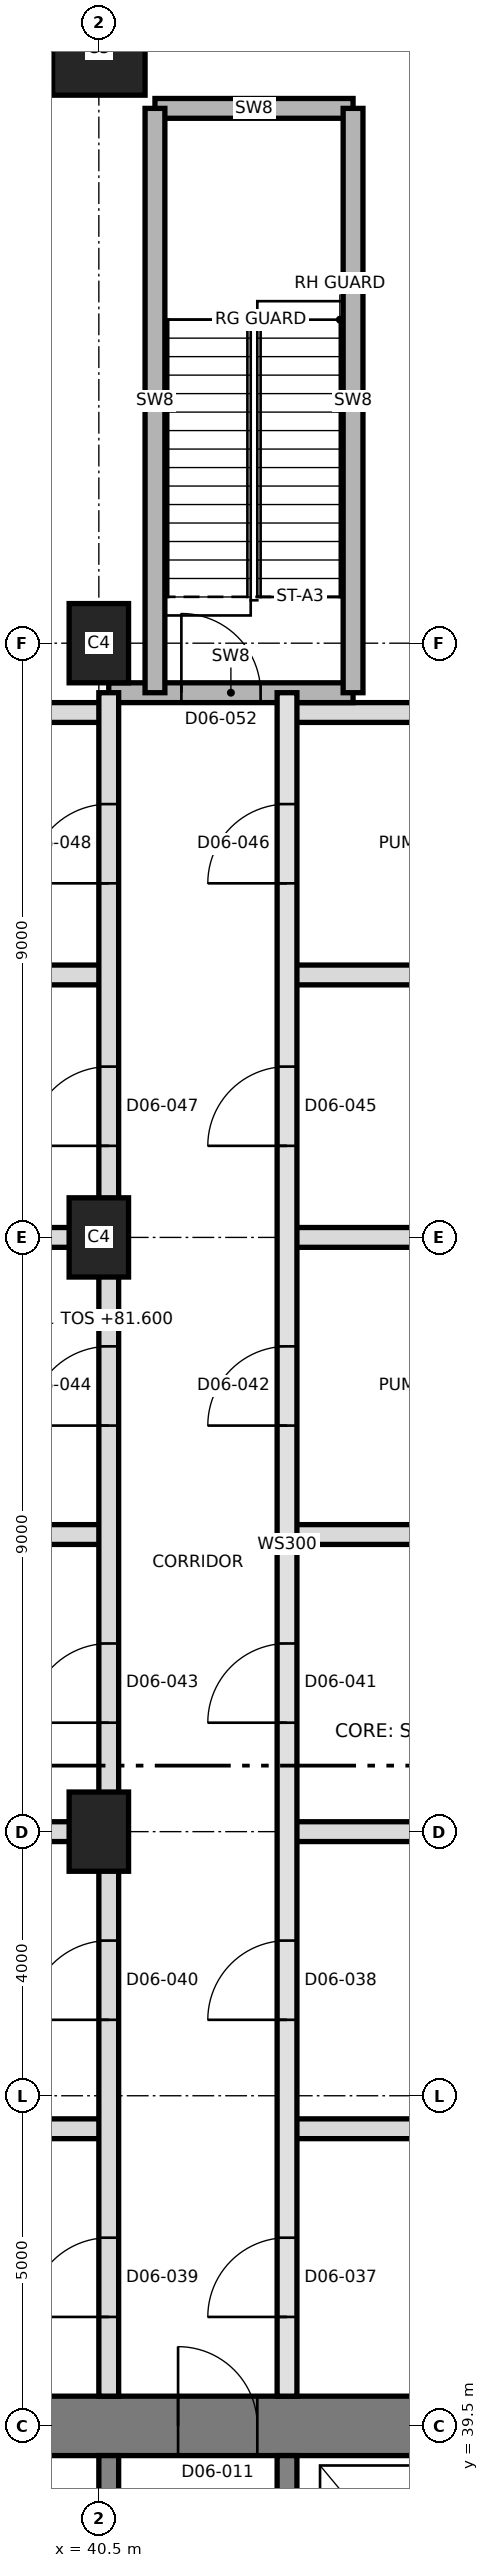
"""IFC4 building model, lengths in metres.
Left out: names, types, materials, properties, quantities, classifications, styles, units other than length and angle.
Written with IfcOpenShell. Run it as: python <this file> out.ifc"""

import sys

from ifc_helpers import new_model, si_unit, direction, frame, frame_2d, origin, origin_2d, place, context, subcontext, project, spatial, rectangle, extrude, element, fill, save


model = new_model("IFC4")
c1 = context("Model", 3, precision=1e-05, world=origin(), true_north=direction((0.0, 1.0)))
c2 = subcontext(c1, "Body", "Model", "MODEL_VIEW")
j1 = project(units=[si_unit("LENGTHUNIT", "METRE"), si_unit("PLANEANGLEUNIT", "RADIAN")], contexts=[c1])
p1 = place(None, origin())
s1 = spatial("IfcSite", under=j1, at=p1, CompositionType="ELEMENT")
p2 = place(p1, origin())
s2 = spatial("IfcBuilding", under=s1, at=p2, CompositionType="ELEMENT")
p3 = place(p2, frame((0.0, 0.0, 81.6)))
s3 = spatial("IfcBuildingStorey", under=s2, at=p3, CompositionType="ELEMENT", Elevation=81.6)
p4 = place(p3, frame((31.05, 39.5, 0.0), z_axis=(0.0, 0.0, 1.0), x_axis=(1.0, 0.0, 0.0)))
e1 = element("IfcWall", 1, at=p4, inside=s3, PredefinedType="SHEAR", context=c2, shape_type="SweptSolid", body=[
    extrude(rectangle(XDim=27.0, YDim=0.9, at=frame_2d((13.5, 0.0))), origin(), (0.0, 0.0, 1.0), 5.5),
])
p5 = place(p4, frame((10.65, 0.0, 0.0)))
e2 = element("IfcOpeningElement", 2, at=p5, cuts=e1, PredefinedType="OPENING", context=c2, shape_type="SweptSolid", body=[
    extrude(rectangle(XDim=1.2, YDim=2.1, at=frame_2d((0.6, 1.05))), frame((0.0, 0.46, 0.0), z_axis=(0.0, -1.0, 0.0), x_axis=(1.0, 0.0, 0.0)), (0.0, 0.0, 1.0), 0.92),
])
for number, where, z_axis, x_axis in (
    (3, (40.65, 33.5, 0.0), (0.0, 0.0, 1.0), (0.0, 1.0, 0.0)),
    (4, (43.35, 33.5, 0.0), (0.0, 0.0, 1.0), (0.0, 1.0, 0.0)),
):
    element("IfcWall", number, at=place(p3, frame(where, z_axis=z_axis, x_axis=x_axis)), inside=s3, PredefinedType="SHEAR", context=c2, shape_type="SweptSolid", body=[
        extrude(rectangle(XDim=5.55, YDim=0.3, at=frame_2d((2.775, 0.0))), origin(), (0.0, 0.0, 1.0), 5.5),
    ])
for number, where, z_axis, x_axis in (
    (5, (40.5, 48.5, 0.0), (0.0, 0.0, 1.0), (0.0, 1.0, 0.0)),
    (6, (40.5, 57.5, 0.0), (0.0, 0.0, 1.0), (0.0, 1.0, 0.0)),
    (7, (40.5, 66.5, 0.0), (0.0, 0.0, 1.0), (0.0, 1.0, 0.0)),
):
    element("IfcColumn", number, at=place(p3, frame(where, z_axis=z_axis, x_axis=x_axis)), inside=s3, PredefinedType="COLUMN", context=c2, shape_type="SweptSolid", body=[
        extrude(rectangle(XDim=1.2, YDim=0.9, at=origin_2d()), origin(), (0.0, 0.0, 1.0), 5.5),
    ])
p6 = place(p3, frame((40.5, 75.5, 0.0), z_axis=(0.0, 0.0, 1.0), x_axis=(1.0, 0.0, 0.0)))
e8 = element("IfcColumn", 8, at=p6, inside=s3, PredefinedType="COLUMN", context=c2, shape_type="SweptSolid", body=[
    extrude(rectangle(XDim=1.4, YDim=1.4, at=origin_2d()), origin(), (0.0, 0.0, 1.0), 5.5),
])
p7 = place(p3, frame((49.149, 72.498, 0.0), z_axis=(0.0, 0.0, 1.0), x_axis=(-0.773023777565, 0.634377048229, 0.0)))
e9 = element("IfcWall", 9, at=p7, inside=s3, PredefinedType="SOLIDWALL", context=c2, shape_type="SweptSolid", body=[
    extrude(rectangle(XDim=5.633, YDim=0.3, at=frame_2d((2.816, 0.0))), origin(), (0.0, 0.0, 1.0), 5.2),
])
p8 = place(p3, frame((39.978, 76.836, 0.0), z_axis=(0.0, 0.0, 1.0), x_axis=(-0.956941081769, -0.29028221789, 0.0)))
e10 = element("IfcWall", 10, at=p8, inside=s3, PredefinedType="SOLIDWALL", context=c2, shape_type="SweptSolid", body=[
    extrude(rectangle(XDim=5.646, YDim=0.3, at=frame_2d((2.823, 0.0))), origin(), (0.0, 0.0, 1.0), 5.2),
])
p9 = place(p3, frame((31.9, 44.0, 0.0), z_axis=(0.0, 0.0, 1.0), x_axis=(1.0, 0.0, 0.0)))
e11 = element("IfcWall", 11, at=p9, inside=s3, PredefinedType="PARTITIONING", context=c2, shape_type="SweptSolid", body=[
    extrude(rectangle(XDim=8.75, YDim=0.3, at=frame_2d((4.375, 0.0))), origin(), (0.0, 0.0, 1.0), 5.2),
])
p10 = place(p3, frame((43.35, 44.0, 0.0), z_axis=(0.0, 0.0, 1.0), x_axis=(1.0, 0.0, 0.0)))
e12 = element("IfcWall", 12, at=p10, inside=s3, PredefinedType="PARTITIONING", context=c2, shape_type="SweptSolid", body=[
    extrude(rectangle(XDim=7.592, YDim=0.3, at=frame_2d((3.796, 0.0))), origin(), (0.0, 0.0, 1.0), 5.15),
])
p11 = place(p3, frame((31.9, 48.5, 0.0), z_axis=(0.0, 0.0, 1.0), x_axis=(1.0, 0.0, 0.0)))
e13 = element("IfcWall", 13, at=p11, inside=s3, PredefinedType="PARTITIONING", context=c2, shape_type="SweptSolid", body=[
    extrude(rectangle(XDim=8.75, YDim=0.3, at=frame_2d((4.375, 0.0))), origin(), (0.0, 0.0, 1.0), 5.2),
])
p12 = place(p3, frame((43.35, 48.5, 0.0), z_axis=(0.0, 0.0, 1.0), x_axis=(1.0, 0.0, 0.0)))
e14 = element("IfcWall", 14, at=p12, inside=s3, PredefinedType="PARTITIONING", context=c2, shape_type="SweptSolid", body=[
    extrude(rectangle(XDim=7.3, YDim=0.3, at=frame_2d((3.65, 0.0))), origin(), (0.0, 0.0, 1.0), 5.15),
])
p13 = place(p3, frame((31.9, 53.0, 0.0), z_axis=(0.0, 0.0, 1.0), x_axis=(1.0, 0.0, 0.0)))
e15 = element("IfcWall", 15, at=p13, inside=s3, PredefinedType="PARTITIONING", context=c2, shape_type="SweptSolid", body=[
    extrude(rectangle(XDim=8.75, YDim=0.3, at=frame_2d((4.375, 0.0))), origin(), (0.0, 0.0, 1.0), 5.2),
])
p14 = place(p3, frame((43.35, 53.0, 0.0), z_axis=(0.0, 0.0, 1.0), x_axis=(1.0, 0.0, 0.0)))
e16 = element("IfcWall", 16, at=p14, inside=s3, PredefinedType="PARTITIONING", context=c2, shape_type="SweptSolid", body=[
    extrude(rectangle(XDim=5.75, YDim=0.3, at=frame_2d((2.875, 0.0))), origin(), (0.0, 0.0, 1.0), 5.2),
])
p15 = place(p3, frame((31.9, 57.5, 0.0), z_axis=(0.0, 0.0, 1.0), x_axis=(1.0, 0.0, 0.0)))
e17 = element("IfcWall", 17, at=p15, inside=s3, PredefinedType="PARTITIONING", context=c2, shape_type="SweptSolid", body=[
    extrude(rectangle(XDim=8.75, YDim=0.3, at=frame_2d((4.375, 0.0))), origin(), (0.0, 0.0, 1.0), 5.2),
])
p16 = place(p3, frame((43.35, 57.5, 0.0), z_axis=(0.0, 0.0, 1.0), x_axis=(1.0, 0.0, 0.0)))
e18 = element("IfcWall", 18, at=p16, inside=s3, PredefinedType="PARTITIONING", context=c2, shape_type="SweptSolid", body=[
    extrude(rectangle(XDim=5.75, YDim=0.3, at=frame_2d((2.875, 0.0))), origin(), (0.0, 0.0, 1.0), 5.2),
])
p17 = place(p3, frame((31.9, 61.475, 0.0), z_axis=(0.0, 0.0, 1.0), x_axis=(1.0, 0.0, 0.0)))
e19 = element("IfcWall", 19, at=p17, inside=s3, PredefinedType="PARTITIONING", context=c2, shape_type="SweptSolid", body=[
    extrude(rectangle(XDim=8.75, YDim=0.3, at=frame_2d((4.375, 0.0))), origin(), (0.0, 0.0, 1.0), 5.2),
])
p18 = place(p3, frame((43.35, 61.475, 0.0), z_axis=(0.0, 0.0, 1.0), x_axis=(1.0, 0.0, 0.0)))
e20 = element("IfcWall", 20, at=p18, inside=s3, PredefinedType="PARTITIONING", context=c2, shape_type="SweptSolid", body=[
    extrude(rectangle(XDim=5.75, YDim=0.3, at=frame_2d((2.875, 0.0))), origin(), (0.0, 0.0, 1.0), 5.2),
])
p19 = place(p3, frame((31.9, 65.45, 0.0), z_axis=(0.0, 0.0, 1.0), x_axis=(1.0, 0.0, 0.0)))
e21 = element("IfcWall", 21, at=p19, inside=s3, PredefinedType="PARTITIONING", context=c2, shape_type="SweptSolid", body=[
    extrude(rectangle(XDim=8.75, YDim=0.3, at=frame_2d((4.375, 0.0))), origin(), (0.0, 0.0, 1.0), 5.2),
])
p20 = place(p3, frame((43.35, 65.45, 0.0), z_axis=(0.0, 0.0, 1.0), x_axis=(1.0, 0.0, 0.0)))
e22 = element("IfcWall", 22, at=p20, inside=s3, PredefinedType="PARTITIONING", context=c2, shape_type="SweptSolid", body=[
    extrude(rectangle(XDim=5.75, YDim=0.3, at=frame_2d((2.875, 0.0))), origin(), (0.0, 0.0, 1.0), 5.2),
])
p21 = place(p3, frame((40.65, 65.75, 0.0), z_axis=(0.0, 0.0, 1.0), x_axis=(1.0, 0.0, 0.0)))
e23 = element("IfcWall", 23, at=p21, inside=s3, PredefinedType="SHEAR", context=c2, shape_type="SweptSolid", body=[
    extrude(rectangle(XDim=3.7, YDim=0.3, at=frame_2d((1.85, 0.0))), origin(), (0.0, 0.0, 1.0), 5.2),
])
p22 = place(p21, frame((1.1, 0.0, 0.0)))
e24 = element("IfcOpeningElement", 24, at=p22, cuts=e23, PredefinedType="OPENING", context=c2, shape_type="SweptSolid", body=[
    extrude(rectangle(XDim=1.2, YDim=2.1, at=frame_2d((0.6, 1.05))), frame((0.0, 0.16, 0.0), z_axis=(0.0, -1.0, 0.0), x_axis=(1.0, 0.0, 0.0)), (0.0, 0.0, 1.0), 0.32),
])
p23 = place(p3, frame((41.35, 74.6, 0.0), z_axis=(0.0, 0.0, 1.0), x_axis=(1.0, 0.0, 0.0)))
e25 = element("IfcWall", 25, at=p23, inside=s3, PredefinedType="SHEAR", context=c2, shape_type="SweptSolid", body=[
    extrude(rectangle(XDim=3.0, YDim=0.3, at=frame_2d((1.5, 0.0))), origin(), (0.0, 0.0, 1.0), 5.2),
])
p24 = place(p3, frame((40.65, 39.95, 0.0), z_axis=(0.0, 0.0, 1.0), x_axis=(0.0, 1.0, 0.0)))
e26 = element("IfcWall", 26, at=p24, inside=s3, PredefinedType="PARTITIONING", context=c2, shape_type="SweptSolid", body=[
    extrude(rectangle(XDim=25.8, YDim=0.3, at=frame_2d((12.9, 0.0))), origin(), (0.0, 0.0, 1.0), 5.2),
])
p25 = place(p24, frame((1.2, 0.0, 0.0)))
e27 = element("IfcOpeningElement", 27, at=p25, cuts=e26, PredefinedType="OPENING", context=c2, shape_type="SweptSolid", body=[
    extrude(rectangle(XDim=1.2, YDim=2.1, at=frame_2d((0.6, 1.05))), frame((0.0, 0.16, 0.0), z_axis=(0.0, -1.0, 0.0), x_axis=(1.0, 0.0, 0.0)), (0.0, 0.0, 1.0), 0.32),
])
p26 = place(p24, frame((5.7, 0.0, 0.0)))
e28 = element("IfcOpeningElement", 28, at=p26, cuts=e26, PredefinedType="OPENING", context=c2, shape_type="SweptSolid", body=[
    extrude(rectangle(XDim=1.2, YDim=2.1, at=frame_2d((0.6, 1.05))), frame((0.0, 0.16, 0.0), z_axis=(0.0, -1.0, 0.0), x_axis=(1.0, 0.0, 0.0)), (0.0, 0.0, 1.0), 0.32),
])
p27 = place(p24, frame((10.2, 0.0, 0.0)))
e29 = element("IfcOpeningElement", 29, at=p27, cuts=e26, PredefinedType="OPENING", context=c2, shape_type="SweptSolid", body=[
    extrude(rectangle(XDim=1.2, YDim=2.1, at=frame_2d((0.6, 1.05))), frame((0.0, 0.16, 0.0), z_axis=(0.0, -1.0, 0.0), x_axis=(1.0, 0.0, 0.0)), (0.0, 0.0, 1.0), 0.32),
])
p28 = place(p24, frame((14.7, 0.0, 0.0)))
e30 = element("IfcOpeningElement", 30, at=p28, cuts=e26, PredefinedType="OPENING", context=c2, shape_type="SweptSolid", body=[
    extrude(rectangle(XDim=1.2, YDim=2.1, at=frame_2d((0.6, 1.05))), frame((0.0, 0.16, 0.0), z_axis=(0.0, -1.0, 0.0), x_axis=(1.0, 0.0, 0.0)), (0.0, 0.0, 1.0), 0.32),
])
p29 = place(p24, frame((18.937, 0.0, 0.0)))
e31 = element("IfcOpeningElement", 31, at=p29, cuts=e26, PredefinedType="OPENING", context=c2, shape_type="SweptSolid", body=[
    extrude(rectangle(XDim=1.2, YDim=2.1, at=frame_2d((0.6, 1.05))), frame((0.0, 0.16, 0.0), z_axis=(0.0, -1.0, 0.0), x_axis=(1.0, 0.0, 0.0)), (0.0, 0.0, 1.0), 0.32),
])
p30 = place(p24, frame((22.913, 0.0, 0.0)))
e32 = element("IfcOpeningElement", 32, at=p30, cuts=e26, PredefinedType="OPENING", context=c2, shape_type="SweptSolid", body=[
    extrude(rectangle(XDim=1.2, YDim=2.1, at=frame_2d((0.6, 1.05))), frame((0.0, 0.16, 0.0), z_axis=(0.0, -1.0, 0.0), x_axis=(1.0, 0.0, 0.0)), (0.0, 0.0, 1.0), 0.32),
])
p31 = place(p3, frame((41.35, 65.75, 0.0), z_axis=(0.0, 0.0, 1.0), x_axis=(0.0, 1.0, 0.0)))
e33 = element("IfcWall", 33, at=p31, inside=s3, PredefinedType="SHEAR", context=c2, shape_type="SweptSolid", body=[
    extrude(rectangle(XDim=8.85, YDim=0.3, at=frame_2d((4.425, 0.0))), origin(), (0.0, 0.0, 1.0), 5.2),
])
p32 = place(p3, frame((43.35, 39.95, 0.0), z_axis=(0.0, 0.0, 1.0), x_axis=(0.0, 1.0, 0.0)))
e34 = element("IfcWall", 34, at=p32, inside=s3, PredefinedType="SOLIDWALL", context=c2, shape_type="SweptSolid", body=[
    extrude(rectangle(XDim=25.8, YDim=0.3, at=frame_2d((12.9, 0.0))), origin(), (0.0, 0.0, 1.0), 5.2),
])
p33 = place(p32, frame((1.2, 0.0, 0.0)))
e35 = element("IfcOpeningElement", 35, at=p33, cuts=e34, PredefinedType="OPENING", context=c2, shape_type="SweptSolid", body=[
    extrude(rectangle(XDim=1.2, YDim=2.1, at=frame_2d((0.6, 1.05))), frame((0.0, 0.16, 0.0), z_axis=(0.0, -1.0, 0.0), x_axis=(1.0, 0.0, 0.0)), (0.0, 0.0, 1.0), 0.32),
])
p34 = place(p32, frame((5.7, 0.0, 0.0)))
e36 = element("IfcOpeningElement", 36, at=p34, cuts=e34, PredefinedType="OPENING", context=c2, shape_type="SweptSolid", body=[
    extrude(rectangle(XDim=1.2, YDim=2.1, at=frame_2d((0.6, 1.05))), frame((0.0, 0.16, 0.0), z_axis=(0.0, -1.0, 0.0), x_axis=(1.0, 0.0, 0.0)), (0.0, 0.0, 1.0), 0.32),
])
p35 = place(p32, frame((10.2, 0.0, 0.0)))
e37 = element("IfcOpeningElement", 37, at=p35, cuts=e34, PredefinedType="OPENING", context=c2, shape_type="SweptSolid", body=[
    extrude(rectangle(XDim=1.2, YDim=2.1, at=frame_2d((0.6, 1.05))), frame((0.0, 0.16, 0.0), z_axis=(0.0, -1.0, 0.0), x_axis=(1.0, 0.0, 0.0)), (0.0, 0.0, 1.0), 0.32),
])
p36 = place(p32, frame((14.7, 0.0, 0.0)))
e38 = element("IfcOpeningElement", 38, at=p36, cuts=e34, PredefinedType="OPENING", context=c2, shape_type="SweptSolid", body=[
    extrude(rectangle(XDim=1.2, YDim=2.1, at=frame_2d((0.6, 1.05))), frame((0.0, 0.16, 0.0), z_axis=(0.0, -1.0, 0.0), x_axis=(1.0, 0.0, 0.0)), (0.0, 0.0, 1.0), 0.32),
])
p37 = place(p32, frame((18.937, 0.0, 0.0)))
e39 = element("IfcOpeningElement", 39, at=p37, cuts=e34, PredefinedType="OPENING", context=c2, shape_type="SweptSolid", body=[
    extrude(rectangle(XDim=1.2, YDim=2.1, at=frame_2d((0.6, 1.05))), frame((0.0, 0.16, 0.0), z_axis=(0.0, -1.0, 0.0), x_axis=(1.0, 0.0, 0.0)), (0.0, 0.0, 1.0), 0.32),
])
p38 = place(p32, frame((22.913, 0.0, 0.0)))
e40 = element("IfcOpeningElement", 40, at=p38, cuts=e34, PredefinedType="OPENING", context=c2, shape_type="SweptSolid", body=[
    extrude(rectangle(XDim=1.2, YDim=2.1, at=frame_2d((0.6, 1.05))), frame((0.0, 0.16, 0.0), z_axis=(0.0, -1.0, 0.0), x_axis=(1.0, 0.0, 0.0)), (0.0, 0.0, 1.0), 0.32),
])
p39 = place(p3, frame((44.35, 65.75, 0.0), z_axis=(0.0, 0.0, 1.0), x_axis=(0.0, 1.0, 0.0)))
e41 = element("IfcWall", 41, at=p39, inside=s3, PredefinedType="SHEAR", context=c2, shape_type="SweptSolid", body=[
    extrude(rectangle(XDim=8.85, YDim=0.3, at=frame_2d((4.425, 0.0))), origin(), (0.0, 0.0, 1.0), 5.2),
])
p40 = place(p5, origin())
e42 = element("IfcDoor", 42, at=p40, inside=s3, OperationType="SINGLE_SWING_RIGHT", PredefinedType="DOOR", context=c2, shape_type="SweptSolid", body=[
    extrude(rectangle(XDim=1.2, YDim=2.1, at=frame_2d((0.6, 1.05))), frame((0.0, 0.025, 0.0), z_axis=(0.0, -1.0, 0.0), x_axis=(1.0, 0.0, 0.0)), (0.0, 0.0, 1.0), 0.05),
])
fill(e2, e42)
p41 = place(p33, origin())
e43 = element("IfcDoor", 43, at=p41, inside=s3, OperationType="SINGLE_SWING_LEFT", PredefinedType="DOOR", context=c2, shape_type="SweptSolid", body=[
    extrude(rectangle(XDim=1.2, YDim=2.1, at=frame_2d((0.6, 1.05))), frame((0.0, 0.025, 0.0), z_axis=(0.0, -1.0, 0.0), x_axis=(1.0, 0.0, 0.0)), (0.0, 0.0, 1.0), 0.05),
])
fill(e35, e43)
p42 = place(p34, origin())
e44 = element("IfcDoor", 44, at=p42, inside=s3, OperationType="SINGLE_SWING_LEFT", PredefinedType="DOOR", context=c2, shape_type="SweptSolid", body=[
    extrude(rectangle(XDim=1.2, YDim=2.1, at=frame_2d((0.6, 1.05))), frame((0.0, 0.025, 0.0), z_axis=(0.0, -1.0, 0.0), x_axis=(1.0, 0.0, 0.0)), (0.0, 0.0, 1.0), 0.05),
])
fill(e36, e44)
p43 = place(p25, origin())
e45 = element("IfcDoor", 45, at=p43, inside=s3, OperationType="SINGLE_SWING_RIGHT", PredefinedType="DOOR", context=c2, shape_type="SweptSolid", body=[
    extrude(rectangle(XDim=1.2, YDim=2.1, at=frame_2d((0.6, 1.05))), frame((0.0, 0.025, 0.0), z_axis=(0.0, -1.0, 0.0), x_axis=(1.0, 0.0, 0.0)), (0.0, 0.0, 1.0), 0.05),
])
fill(e27, e45)
p44 = place(p26, origin())
e46 = element("IfcDoor", 46, at=p44, inside=s3, OperationType="SINGLE_SWING_LEFT", PredefinedType="DOOR", context=c2, shape_type="SweptSolid", body=[
    extrude(rectangle(XDim=1.2, YDim=2.1, at=frame_2d((0.6, 1.05))), frame((0.0, 0.025, 0.0), z_axis=(0.0, -1.0, 0.0), x_axis=(1.0, 0.0, 0.0)), (0.0, 0.0, 1.0), 0.05),
])
fill(e28, e46)
p45 = place(p35, origin())
e47 = element("IfcDoor", 47, at=p45, inside=s3, OperationType="SINGLE_SWING_LEFT", PredefinedType="DOOR", context=c2, shape_type="SweptSolid", body=[
    extrude(rectangle(XDim=1.2, YDim=2.1, at=frame_2d((0.6, 1.05))), frame((0.0, 0.025, 0.0), z_axis=(0.0, -1.0, 0.0), x_axis=(1.0, 0.0, 0.0)), (0.0, 0.0, 1.0), 0.05),
])
fill(e37, e47)
p46 = place(p36, origin())
e48 = element("IfcDoor", 48, at=p46, inside=s3, OperationType="SINGLE_SWING_RIGHT", PredefinedType="DOOR", context=c2, shape_type="SweptSolid", body=[
    extrude(rectangle(XDim=1.2, YDim=2.1, at=frame_2d((0.6, 1.05))), frame((0.0, 0.025, 0.0), z_axis=(0.0, -1.0, 0.0), x_axis=(1.0, 0.0, 0.0)), (0.0, 0.0, 1.0), 0.05),
])
fill(e38, e48)
p47 = place(p27, origin())
e49 = element("IfcDoor", 49, at=p47, inside=s3, OperationType="SINGLE_SWING_LEFT", PredefinedType="DOOR", context=c2, shape_type="SweptSolid", body=[
    extrude(rectangle(XDim=1.2, YDim=2.1, at=frame_2d((0.6, 1.05))), frame((0.0, 0.025, 0.0), z_axis=(0.0, -1.0, 0.0), x_axis=(1.0, 0.0, 0.0)), (0.0, 0.0, 1.0), 0.05),
])
fill(e29, e49)
p48 = place(p28, origin())
e50 = element("IfcDoor", 50, at=p48, inside=s3, OperationType="SINGLE_SWING_LEFT", PredefinedType="DOOR", context=c2, shape_type="SweptSolid", body=[
    extrude(rectangle(XDim=1.2, YDim=2.1, at=frame_2d((0.6, 1.05))), frame((0.0, 0.025, 0.0), z_axis=(0.0, -1.0, 0.0), x_axis=(1.0, 0.0, 0.0)), (0.0, 0.0, 1.0), 0.05),
])
fill(e30, e50)
p49 = place(p37, origin())
e51 = element("IfcDoor", 51, at=p49, inside=s3, OperationType="SINGLE_SWING_RIGHT", PredefinedType="DOOR", context=c2, shape_type="SweptSolid", body=[
    extrude(rectangle(XDim=1.2, YDim=2.1, at=frame_2d((0.6, 1.05))), frame((0.0, 0.025, 0.0), z_axis=(0.0, -1.0, 0.0), x_axis=(1.0, 0.0, 0.0)), (0.0, 0.0, 1.0), 0.05),
])
fill(e39, e51)
p50 = place(p38, origin())
e52 = element("IfcDoor", 52, at=p50, inside=s3, OperationType="SINGLE_SWING_LEFT", PredefinedType="DOOR", context=c2, shape_type="SweptSolid", body=[
    extrude(rectangle(XDim=1.2, YDim=2.1, at=frame_2d((0.6, 1.05))), frame((0.0, 0.025, 0.0), z_axis=(0.0, -1.0, 0.0), x_axis=(1.0, 0.0, 0.0)), (0.0, 0.0, 1.0), 0.05),
])
fill(e40, e52)
p51 = place(p29, origin())
e53 = element("IfcDoor", 53, at=p51, inside=s3, OperationType="SINGLE_SWING_LEFT", PredefinedType="DOOR", context=c2, shape_type="SweptSolid", body=[
    extrude(rectangle(XDim=1.2, YDim=2.1, at=frame_2d((0.6, 1.05))), frame((0.0, 0.025, 0.0), z_axis=(0.0, -1.0, 0.0), x_axis=(1.0, 0.0, 0.0)), (0.0, 0.0, 1.0), 0.05),
])
fill(e31, e53)
p52 = place(p30, origin())
e54 = element("IfcDoor", 54, at=p52, inside=s3, OperationType="SINGLE_SWING_RIGHT", PredefinedType="DOOR", context=c2, shape_type="SweptSolid", body=[
    extrude(rectangle(XDim=1.2, YDim=2.1, at=frame_2d((0.6, 1.05))), frame((0.0, 0.025, 0.0), z_axis=(0.0, -1.0, 0.0), x_axis=(1.0, 0.0, 0.0)), (0.0, 0.0, 1.0), 0.05),
])
fill(e32, e54)
p53 = place(p22, origin())
e55 = element("IfcDoor", 55, at=p53, inside=s3, OperationType="SINGLE_SWING_RIGHT", PredefinedType="DOOR", context=c2, shape_type="SweptSolid", body=[
    extrude(rectangle(XDim=1.2, YDim=2.1, at=frame_2d((0.6, 1.05))), frame((0.0, 0.025, 0.0), z_axis=(0.0, -1.0, 0.0), x_axis=(1.0, 0.0, 0.0)), (0.0, 0.0, 1.0), 0.05),
])
fill(e24, e55)
save(model, sys.argv[1])
